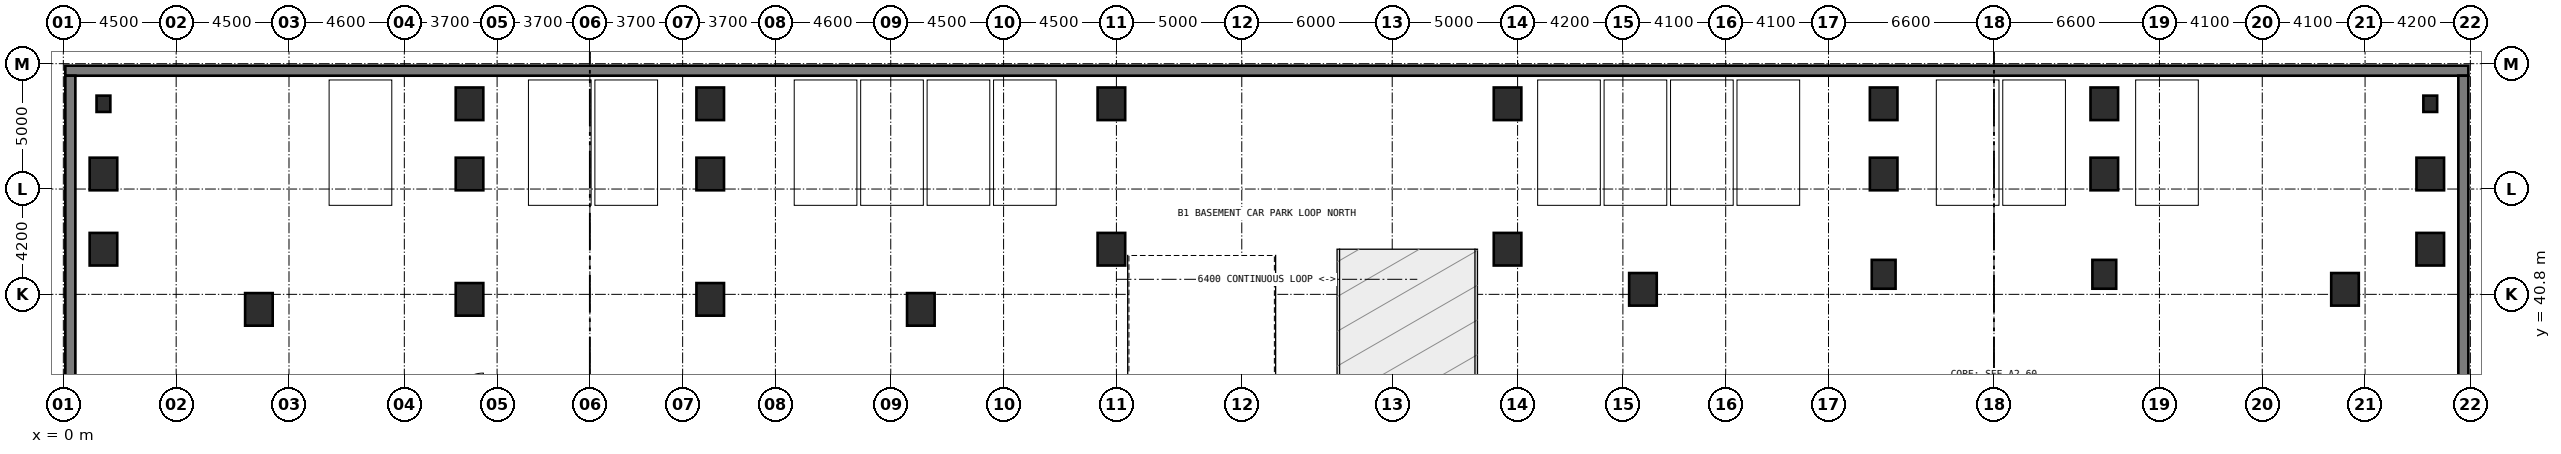
"""IFC4 building model, lengths in metres.
Left out: names, types, materials, properties, quantities, classifications, styles, units other than length and angle.
Written with IfcOpenShell. Run it as: python <this file> out.ifc"""

import sys

from ifc_helpers import new_model, si_unit, direction, frame, frame_2d, origin, origin_2d, place, context, subcontext, project, spatial, rectangle, extrude, element, save


model = new_model("IFC4")
c1 = context("Model", 3, precision=1e-05, world=origin(), true_north=direction((0.0, 1.0)))
c2 = subcontext(c1, "Body", "Model", "MODEL_VIEW")
j1 = project(units=[si_unit("LENGTHUNIT", "METRE"), si_unit("PLANEANGLEUNIT", "RADIAN")], contexts=[c1])
p1 = place(None, origin())
s1 = spatial("IfcSite", under=j1, at=p1, CompositionType="ELEMENT")
p2 = place(p1, origin())
s2 = spatial("IfcBuilding", under=s1, at=p2, CompositionType="ELEMENT")
p3 = place(p2, frame((0.0, 0.0, -4.2)))
s3 = spatial("IfcBuildingStorey", under=s2, at=p3, CompositionType="ELEMENT", Elevation=-4.2)
p4 = place(p3, frame((95.92, 49.72, 0.0), z_axis=(0.0, 0.0, 1.0), x_axis=(-1.0, 0.0, 0.0)))
e1 = element("IfcWall", 1, at=p4, inside=s3, PredefinedType="USERDEFINED", context=c2, shape_type="SweptSolid", body=[
    extrude(rectangle(XDim=95.84, YDim=0.4, at=frame_2d((47.92, 0.0))), origin(), (0.0, 0.0, 1.0), 4.2),
])
for number, where, z_axis, x_axis in (
    (2, (0.28, 49.52, 0.0), (0.0, 0.0, 1.0), (0.0, -1.0, 0.0)),
    (3, (95.72, 0.48, 0.0), (0.0, 0.0, 1.0), (0.0, 1.0, 0.0)),
):
    element("IfcWall", number, at=place(p3, frame(where, z_axis=z_axis, x_axis=x_axis)), inside=s3, PredefinedType="USERDEFINED", context=c2, shape_type="SweptSolid", body=[
        extrude(rectangle(XDim=49.04, YDim=0.4, at=frame_2d((24.52, 0.0))), origin(), (0.0, 0.0, 1.0), 4.2),
    ])
for number, where, z_axis, x_axis in (
    (4, (16.2, 40.6, 0.0), (0.0, 0.0, 1.0), (1.0, 0.0, 0.0)),
    (5, (25.8, 40.6, 0.0), (0.0, 0.0, 1.0), (1.0, 0.0, 0.0)),
    (6, (34.2, 40.2, 0.0), (0.0, 0.0, 1.0), (1.0, 0.0, 0.0)),
    (7, (7.8, 40.2, 0.0), (0.0, 0.0, 1.0), (1.0, 0.0, 0.0)),
):
    element("IfcColumn", number, at=place(p3, frame(where, z_axis=z_axis, x_axis=x_axis)), inside=s3, PredefinedType="COLUMN", context=c2, shape_type="SweptSolid", body=[
        extrude(rectangle(XDim=1.1, YDim=1.3, at=origin_2d()), origin(), (0.0, 0.0, 1.0), 4.2),
    ])
for number, where, z_axis, x_axis in (
    (8, (72.6, 41.6, 0.0), (0.0, 0.0, 1.0), (1.0, 0.0, 0.0)),
    (9, (81.4, 41.6, 0.0), (0.0, 0.0, 1.0), (1.0, 0.0, 0.0)),
):
    element("IfcColumn", number, at=place(p3, frame(where, z_axis=z_axis, x_axis=x_axis)), inside=s3, PredefinedType="COLUMN", context=c2, shape_type="SweptSolid", body=[
        extrude(rectangle(XDim=0.95, YDim=1.15, at=origin_2d()), origin(), (0.0, 0.0, 1.0), 4.2),
    ])
for number, where, z_axis, x_axis in (
    (10, (91.0, 41.0, 0.0), (0.0, 0.0, 1.0), (1.0, 0.0, 0.0)),
    (11, (63.0, 41.0, 0.0), (0.0, 0.0, 1.0), (1.0, 0.0, 0.0)),
):
    element("IfcColumn", number, at=place(p3, frame(where, z_axis=z_axis, x_axis=x_axis)), inside=s3, PredefinedType="COLUMN", context=c2, shape_type="SweptSolid", body=[
        extrude(rectangle(XDim=1.1, YDim=1.3, at=origin_2d()), origin(), (0.0, 0.0, 1.0), 4.2),
    ])
p5 = place(p3, frame((1.6, 48.4, 0.0), z_axis=(0.0, 0.0, 1.0), x_axis=(1.0, 0.0, 0.0)))
e12 = element("IfcColumn", 12, at=p5, inside=s3, PredefinedType="PILASTER", context=c2, shape_type="SweptSolid", body=[
    extrude(rectangle(XDim=0.55, YDim=0.65, at=origin_2d()), origin(), (0.0, 0.0, 1.0), 4.2),
])
for number, where, z_axis, x_axis in (
    (13, (16.2, 48.4, 0.0), (0.0, 0.0, 1.0), (1.0, 0.0, 0.0)),
    (14, (25.8, 48.4, 0.0), (0.0, 0.0, 1.0), (1.0, 0.0, 0.0)),
    (15, (41.8, 48.4, 0.0), (0.0, 0.0, 1.0), (1.0, 0.0, 0.0)),
    (16, (57.6, 48.4, 0.0), (0.0, 0.0, 1.0), (1.0, 0.0, 0.0)),
    (17, (72.6, 48.4, 0.0), (0.0, 0.0, 1.0), (1.0, 0.0, 0.0)),
    (18, (81.4, 48.4, 0.0), (0.0, 0.0, 1.0), (1.0, 0.0, 0.0)),
):
    element("IfcColumn", number, at=place(p3, frame(where, z_axis=z_axis, x_axis=x_axis)), inside=s3, PredefinedType="COLUMN", context=c2, shape_type="SweptSolid", body=[
        extrude(rectangle(XDim=1.1, YDim=1.3, at=origin_2d()), origin(), (0.0, 0.0, 1.0), 4.2),
    ])
p6 = place(p3, frame((94.4, 48.4, 0.0), z_axis=(0.0, 0.0, 1.0), x_axis=(1.0, 0.0, 0.0)))
e19 = element("IfcColumn", 19, at=p6, inside=s3, PredefinedType="PILASTER", context=c2, shape_type="SweptSolid", body=[
    extrude(rectangle(XDim=0.55, YDim=0.65, at=origin_2d()), origin(), (0.0, 0.0, 1.0), 4.2),
])
for number, where, z_axis, x_axis in (
    (20, (1.6, 45.6, 0.0), (0.0, 0.0, 1.0), (1.0, 0.0, 0.0)),
    (21, (16.2, 45.6, 0.0), (0.0, 0.0, 1.0), (1.0, 0.0, 0.0)),
    (22, (25.8, 45.6, 0.0), (0.0, 0.0, 1.0), (1.0, 0.0, 0.0)),
    (23, (72.6, 45.6, 0.0), (0.0, 0.0, 1.0), (1.0, 0.0, 0.0)),
    (24, (81.4, 45.6, 0.0), (0.0, 0.0, 1.0), (1.0, 0.0, 0.0)),
    (25, (94.4, 45.6, 0.0), (0.0, 0.0, 1.0), (1.0, 0.0, 0.0)),
    (26, (1.6, 42.6, 0.0), (0.0, 0.0, 1.0), (1.0, 0.0, 0.0)),
    (27, (41.8, 42.6, 0.0), (0.0, 0.0, 1.0), (1.0, 0.0, 0.0)),
    (28, (57.6, 42.6, 0.0), (0.0, 0.0, 1.0), (1.0, 0.0, 0.0)),
    (29, (94.4, 42.6, 0.0), (0.0, 0.0, 1.0), (1.0, 0.0, 0.0)),
):
    element("IfcColumn", number, at=place(p3, frame(where, z_axis=z_axis, x_axis=x_axis)), inside=s3, PredefinedType="COLUMN", context=c2, shape_type="SweptSolid", body=[
        extrude(rectangle(XDim=1.1, YDim=1.3, at=origin_2d()), origin(), (0.0, 0.0, 1.0), 4.2),
    ])
save(model, sys.argv[1])
